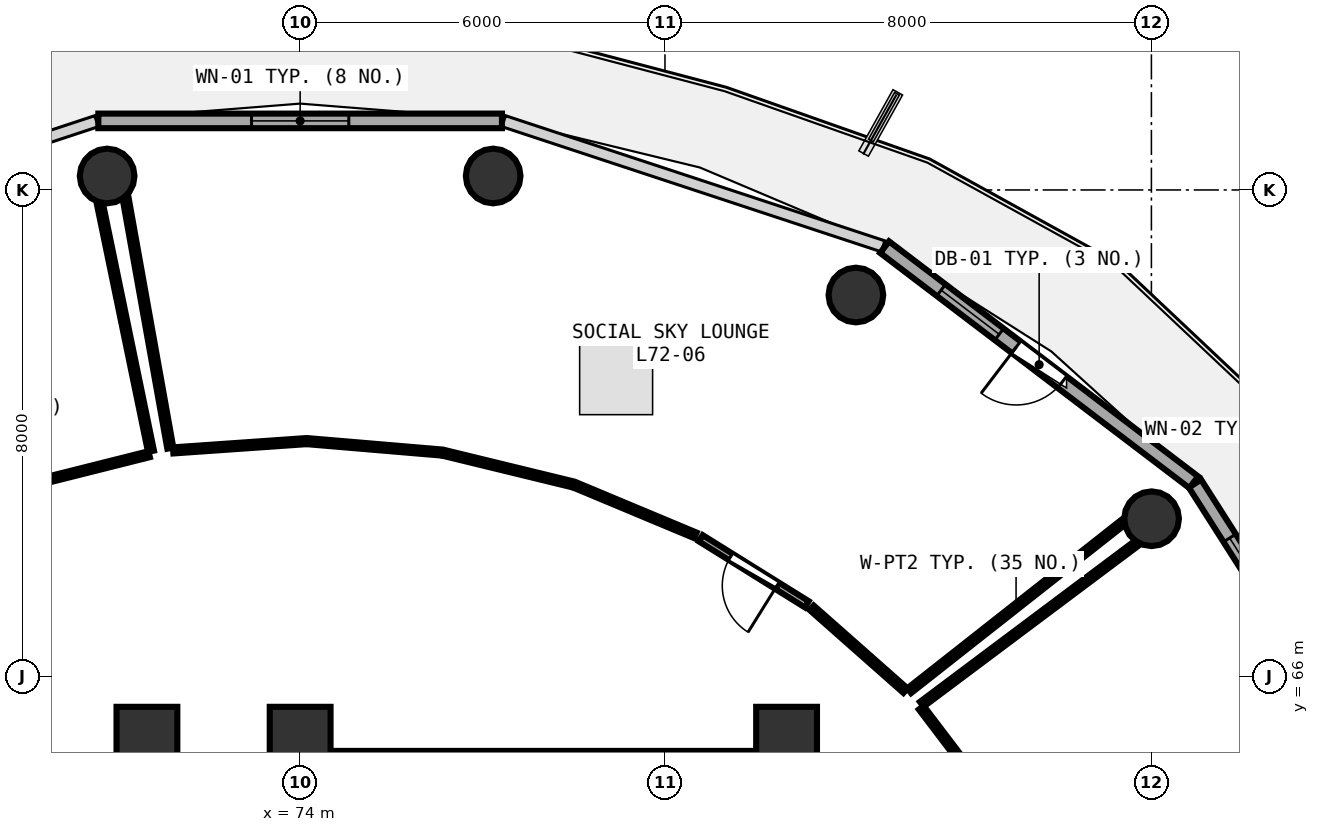
"""IFC4 building model, lengths in metres.
Left out: names, types, materials, properties, quantities, classifications, styles, units other than length and angle.
Written with IfcOpenShell. Run it as: python <this file> out.ifc"""

import sys

from ifc_helpers import new_model, si_unit, direction, frame, frame_2d, origin, origin_2d, place, context, subcontext, project, spatial, rectangle, circle, extrude, element, fill, save


model = new_model("IFC4")
c1 = context("Model", 3, precision=1e-05, world=origin(), true_north=direction((0.0, 1.0)))
c2 = subcontext(c1, "Body", "Model", "MODEL_VIEW")
j1 = project(units=[si_unit("LENGTHUNIT", "METRE"), si_unit("PLANEANGLEUNIT", "RADIAN")], contexts=[c1])
p1 = place(None, origin())
s1 = spatial("IfcSite", under=j1, at=p1, CompositionType="ELEMENT")
p2 = place(p1, origin())
s2 = spatial("IfcBuilding", under=s1, at=p2, CompositionType="ELEMENT")
p3 = place(p2, frame((0.0, 0.0, 282.45)))
s3 = spatial("IfcBuildingStorey", under=s2, at=p3, CompositionType="ELEMENT", Elevation=282.45)
for number, where, z_axis, x_axis in (
    (1, (82.0, 65.0, 0.0), (0.0, 0.0, 1.0), (1.0, 0.0, 0.0)),
    (2, (74.0, 65.0, 0.0), (0.0, 0.0, 1.0), (1.0, 0.0, 0.0)),
    (3, (71.48, 65.0, 0.0), (0.0, 0.0, 1.0), (1.0, 0.0, 0.0)),
):
    element("IfcColumn", number, at=place(p3, frame(where, z_axis=z_axis, x_axis=x_axis)), inside=s3, PredefinedType="PILASTER", context=c2, shape_type="SweptSolid", body=[
        extrude(rectangle(XDim=1.0, YDim=1.0, at=origin_2d()), origin(), (0.0, 0.0, 1.0), 3.75),
    ])
for number, where, z_axis, x_axis in (
    (4, (88.003, 68.593, 0.0), (0.0, 0.0, 1.0), (1.0, 0.0, 0.0)),
    (5, (83.14, 72.272, 0.0), (0.0, 0.0, 1.0), (1.0, 0.0, 0.0)),
    (6, (77.174, 74.229, 0.0), (0.0, 0.0, 1.0), (1.0, 0.0, 0.0)),
    (7, (70.826, 74.229, 0.0), (0.0, 0.0, 1.0), (1.0, 0.0, 0.0)),
):
    element("IfcColumn", number, at=place(p3, frame(where, z_axis=z_axis, x_axis=x_axis)), inside=s3, PredefinedType="COLUMN", context=c2, shape_type="SweptSolid", body=[
        extrude(circle(Radius=0.45, at=origin_2d()), origin(), (0.0, 0.0, 1.0), 3.75),
    ])
p4 = place(p3, frame((92.034, 63.964, 0.0), z_axis=(0.0, 0.0, 1.0), x_axis=(-0.537271968456, 0.843409053728, 0.0)))
e8 = element("IfcWall", 8, at=p4, inside=s3, PredefinedType="SOLIDWALL", context=c2, shape_type="SweptSolid", body=[
    extrude(rectangle(XDim=6.175, YDim=0.24, at=frame_2d((3.087, 0.0))), origin(), (0.0, 0.0, 1.0), 3.475),
])
p5 = place(p4, frame((2.613, 0.0, 0.0)))
e9 = element("IfcOpeningElement", 9, at=p5, cuts=e8, PredefinedType="OPENING", context=c2, shape_type="SweptSolid", body=[
    extrude(rectangle(XDim=0.95, YDim=2.1, at=frame_2d((0.475, 1.05))), frame((0.0, 0.13, 0.0), z_axis=(0.0, -1.0, 0.0), x_axis=(1.0, 0.0, 0.0)), (0.0, 0.0, 1.0), 0.26),
])
p6 = place(p4, frame((3.913, 0.0, 0.85)))
e10 = element("IfcOpeningElement", 10, at=p6, cuts=e8, PredefinedType="OPENING", context=c2, shape_type="SweptSolid", body=[
    extrude(rectangle(XDim=1.2, YDim=1.45, at=frame_2d((0.6, 0.725))), frame((0.0, 0.13, 0.0), z_axis=(0.0, -1.0, 0.0), x_axis=(1.0, 0.0, 0.0)), (0.0, 0.0, 1.0), 0.26),
])
p7 = place(p3, frame((88.696, 69.194, 0.0), z_axis=(0.0, 0.0, 1.0), x_axis=(-0.796010444211, 0.605282886514, 0.0)))
e11 = element("IfcWall", 11, at=p7, inside=s3, PredefinedType="SOLIDWALL", context=c2, shape_type="SweptSolid", body=[
    extrude(rectangle(XDim=6.387, YDim=0.24, at=frame_2d((3.194, 0.0))), origin(), (0.0, 0.0, 1.0), 3.475),
])
p8 = place(p7, frame((2.719, 0.0, 0.0)))
e12 = element("IfcOpeningElement", 12, at=p8, cuts=e11, PredefinedType="OPENING", context=c2, shape_type="SweptSolid", body=[
    extrude(rectangle(XDim=0.95, YDim=2.1, at=frame_2d((0.475, 1.05))), frame((0.0, 0.13, 0.0), z_axis=(0.0, -1.0, 0.0), x_axis=(1.0, 0.0, 0.0)), (0.0, 0.0, 1.0), 0.26),
])
p9 = place(p7, frame((4.019, 0.0, 0.85)))
e13 = element("IfcOpeningElement", 13, at=p9, cuts=e11, PredefinedType="OPENING", context=c2, shape_type="SweptSolid", body=[
    extrude(rectangle(XDim=1.2, YDim=1.45, at=frame_2d((0.6, 0.725))), frame((0.0, 0.13, 0.0), z_axis=(0.0, -1.0, 0.0), x_axis=(1.0, 0.0, 0.0)), (0.0, 0.0, 1.0), 0.26),
])
p10 = place(p3, frame((77.319, 75.136, 0.0), z_axis=(0.0, 0.0, 1.0), x_axis=(-1.0, 0.0, 0.0)))
e14 = element("IfcWall", 14, at=p10, inside=s3, PredefinedType="SOLIDWALL", context=c2, shape_type="SweptSolid", body=[
    extrude(rectangle(XDim=6.638, YDim=0.24, at=frame_2d((3.319, 0.0))), origin(), (0.0, 0.0, 1.0), 3.475),
])
p11 = place(p10, frame((2.519, 0.0, 0.85)))
e15 = element("IfcOpeningElement", 15, at=p11, cuts=e14, PredefinedType="OPENING", context=c2, shape_type="SweptSolid", body=[
    extrude(rectangle(XDim=1.6, YDim=1.45, at=frame_2d((0.8, 0.725))), frame((0.0, 0.13, 0.0), z_axis=(0.0, -1.0, 0.0), x_axis=(1.0, 0.0, 0.0)), (0.0, 0.0, 1.0), 0.26),
])
p12 = place(p3, frame((74.0, 64.6, 0.0), z_axis=(0.0, 0.0, 1.0), x_axis=(1.0, 0.0, 0.0)))
e16 = element("IfcWall", 16, at=p12, inside=s3, PredefinedType="SHEAR", context=c2, shape_type="SweptSolid", body=[
    extrude(rectangle(XDim=8.0, YDim=0.35, at=frame_2d((4.0, 0.0))), origin(), (0.0, 0.0, 1.0), 3.49),
])
p13 = place(p3, frame((82.332, 67.187, 0.0), z_axis=(0.0, 0.0, 1.0), x_axis=(-0.848878791214, 0.528587549823, 0.0)))
e17 = element("IfcWall", 17, at=p13, inside=s3, PredefinedType="PARTITIONING", context=c2, shape_type="SweptSolid", body=[
    extrude(rectangle(XDim=2.053, YDim=0.12, at=frame_2d((1.027, 0.0))), origin(), (0.0, 0.0, 1.0), 3.075),
])
p14 = place(p13, frame((0.577, 0.0, 0.0)))
e18 = element("IfcOpeningElement", 18, at=p14, cuts=e17, PredefinedType="OPENING", context=c2, shape_type="SweptSolid", body=[
    extrude(rectangle(XDim=0.9, YDim=2.08, at=frame_2d((0.45, 1.04))), frame((0.0, 0.07, 0.0), z_axis=(0.0, -1.0, 0.0), x_axis=(1.0, 0.0, 0.0)), (0.0, 0.0, 1.0), 0.14),
])
p15 = place(p3, frame((71.516, 69.654, 0.0), z_axis=(0.0, 0.0, 1.0), x_axis=(-0.969827312174, -0.243792913272, 0.0)))
e19 = element("IfcWall", 19, at=p15, inside=s3, PredefinedType="PARTITIONING", context=c2, shape_type="SweptSolid", body=[
    extrude(rectangle(XDim=2.147, YDim=0.1, at=frame_2d((1.073, 0.0))), origin(), (0.0, 0.0, 1.0), 3.075),
])
p16 = place(p3, frame((70.707, 73.77, 0.0), z_axis=(0.0, 0.0, 1.0), x_axis=(0.202308141573, -0.979321916355, 0.0)))
e20 = element("IfcWall", 20, at=p16, inside=s3, PredefinedType="PARTITIONING", context=c2, shape_type="SweptSolid", body=[
    extrude(rectangle(XDim=4.153, YDim=0.1, at=frame_2d((2.076, 0.0))), origin(), (0.0, 0.0, 1.0), 3.075),
])
p17 = place(p3, frame((85.435, 63.883, 0.0), z_axis=(0.0, 0.0, 1.0), x_axis=(-0.605473441765, 0.795865510823, 0.0)))
e21 = element("IfcWall", 21, at=p17, inside=s3, PredefinedType="PARTITIONING", context=c2, shape_type="SweptSolid", body=[
    extrude(rectangle(XDim=2.014, YDim=0.1, at=frame_2d((1.007, 0.0))), origin(), (0.0, 0.0, 1.0), 3.075),
])
p18 = place(p3, frame((84.223, 65.542, 0.0), z_axis=(0.0, 0.0, 1.0), x_axis=(0.800384816546, 0.599486568191, 0.0)))
e22 = element("IfcWall", 22, at=p18, inside=s3, PredefinedType="PARTITIONING", context=c2, shape_type="SweptSolid", body=[
    extrude(rectangle(XDim=4.414, YDim=0.1, at=frame_2d((2.207, 0.0))), origin(), (0.0, 0.0, 1.0), 3.175),
])
p19 = place(p3, frame((83.955, 65.767, 0.0), z_axis=(0.0, 0.0, 1.0), x_axis=(-0.749539941976, 0.661959119117, 0.0)))
e23 = element("IfcWall", 23, at=p19, inside=s3, PredefinedType="PARTITIONING", context=c2, shape_type="SweptSolid", body=[
    extrude(rectangle(XDim=2.057, YDim=0.1, at=frame_2d((1.029, 0.0))), origin(), (0.0, 0.0, 1.0), 3.075),
])
p20 = place(p3, frame((80.501, 68.319, 0.0), z_axis=(0.0, 0.0, 1.0), x_axis=(-0.922644563927, 0.385651408213, 0.0)))
e24 = element("IfcWall", 24, at=p20, inside=s3, PredefinedType="PARTITIONING", context=c2, shape_type="SweptSolid", body=[
    extrude(rectangle(XDim=2.125, YDim=0.1, at=frame_2d((1.062, 0.0))), origin(), (0.0, 0.0, 1.0), 3.48),
])
p21 = place(p3, frame((78.465, 69.164, 0.0), z_axis=(0.0, 0.0, 1.0), x_axis=(-0.971628772742, 0.236511158257, 0.0)))
e25 = element("IfcWall", 25, at=p21, inside=s3, PredefinedType="PARTITIONING", context=c2, shape_type="SweptSolid", body=[
    extrude(rectangle(XDim=2.147, YDim=0.1, at=frame_2d((1.074, 0.0))), origin(), (0.0, 0.0, 1.0), 3.48),
])
p22 = place(p3, frame((76.3, 69.684, 0.0), z_axis=(0.0, 0.0, 1.0), x_axis=(-0.99643184896, 0.084401246306, 0.0)))
e26 = element("IfcWall", 26, at=p22, inside=s3, PredefinedType="PARTITIONING", context=c2, shape_type="SweptSolid", body=[
    extrude(rectangle(XDim=2.161, YDim=0.1, at=frame_2d((1.081, 0.0))), origin(), (0.0, 0.0, 1.0), 3.075),
])
p23 = place(p3, frame((74.067, 69.867, 0.0), z_axis=(0.0, 0.0, 1.0), x_axis=(-0.997574370957, -0.069608723664, 0.0)))
e27 = element("IfcWall", 27, at=p23, inside=s3, PredefinedType="PARTITIONING", context=c2, shape_type="SweptSolid", body=[
    extrude(rectangle(XDim=2.16, YDim=0.1, at=frame_2d((1.08, 0.0))), origin(), (0.0, 0.0, 1.0), 3.48),
])
p24 = place(p3, frame((71.865, 69.753, 0.0), z_axis=(0.0, 0.0, 1.0), x_axis=(-0.176199339585, 0.984354505618, 0.0)))
e28 = element("IfcWall", 28, at=p24, inside=s3, PredefinedType="PARTITIONING", context=c2, shape_type="SweptSolid", body=[
    extrude(rectangle(XDim=4.176, YDim=0.1, at=frame_2d((2.088, 0.0))), origin(), (0.0, 0.0, 1.0), 3.175),
])
p25 = place(p3, frame((87.532, 68.532, 0.0), z_axis=(0.0, 0.0, 1.0), x_axis=(-0.785736749878, -0.618561039745, 0.0)))
e29 = element("IfcWall", 29, at=p25, inside=s3, PredefinedType="PARTITIONING", context=c2, shape_type="SweptSolid", body=[
    extrude(rectangle(XDim=4.475, YDim=0.1, at=frame_2d((2.237, 0.0))), origin(), (0.0, 0.0, 1.0), 3.075),
])
p26 = place(p6, origin())
e30 = element("IfcWindow", 30, at=p26, inside=s3, PartitioningType="SINGLE_PANEL", PredefinedType="WINDOW", context=c2, shape_type="SweptSolid", body=[
    extrude(rectangle(XDim=1.2, YDim=1.45, at=frame_2d((0.6, 0.725))), frame((0.0, 0.03, 0.0), z_axis=(0.0, -1.0, 0.0), x_axis=(1.0, 0.0, 0.0)), (0.0, 0.0, 1.0), 0.06),
])
fill(e10, e30)
p27 = place(p8, frame((0.95, 0.0, 0.0), z_axis=(0.0, 0.0, 1.0), x_axis=(-1.0, 0.0, 0.0)))
e31 = element("IfcDoor", 31, at=p27, inside=s3, OperationType="SINGLE_SWING_LEFT", PredefinedType="DOOR", context=c2, shape_type="SweptSolid", body=[
    extrude(rectangle(XDim=0.95, YDim=2.1, at=frame_2d((0.475, 1.05))), frame((0.0, 0.025, 0.0), z_axis=(0.0, -1.0, 0.0), x_axis=(1.0, 0.0, 0.0)), (0.0, 0.0, 1.0), 0.05),
])
fill(e12, e31)
p28 = place(p9, origin())
e32 = element("IfcWindow", 32, at=p28, inside=s3, PartitioningType="SINGLE_PANEL", PredefinedType="WINDOW", context=c2, shape_type="SweptSolid", body=[
    extrude(rectangle(XDim=1.2, YDim=1.45, at=frame_2d((0.6, 0.725))), frame((0.0, 0.03, 0.0), z_axis=(0.0, -1.0, 0.0), x_axis=(1.0, 0.0, 0.0)), (0.0, 0.0, 1.0), 0.06),
])
fill(e13, e32)
p29 = place(p11, origin())
e33 = element("IfcWindow", 33, at=p29, inside=s3, PartitioningType="SINGLE_PANEL", PredefinedType="WINDOW", context=c2, shape_type="SweptSolid", body=[
    extrude(rectangle(XDim=1.6, YDim=1.45, at=frame_2d((0.8, 0.725))), frame((0.0, 0.03, 0.0), z_axis=(0.0, -1.0, 0.0), x_axis=(1.0, 0.0, 0.0)), (0.0, 0.0, 1.0), 0.06),
])
fill(e15, e33)
p30 = place(p14, origin())
e34 = element("IfcDoor", 34, at=p30, inside=s3, OperationType="SINGLE_SWING_LEFT", PredefinedType="DOOR", context=c2, shape_type="SweptSolid", body=[
    extrude(rectangle(XDim=0.9, YDim=2.08, at=frame_2d((0.45, 1.04))), frame((0.0, 0.025, 0.0), z_axis=(0.0, -1.0, 0.0), x_axis=(1.0, 0.0, 0.0)), (0.0, 0.0, 1.0), 0.05),
])
fill(e18, e34)
save(model, sys.argv[1])
